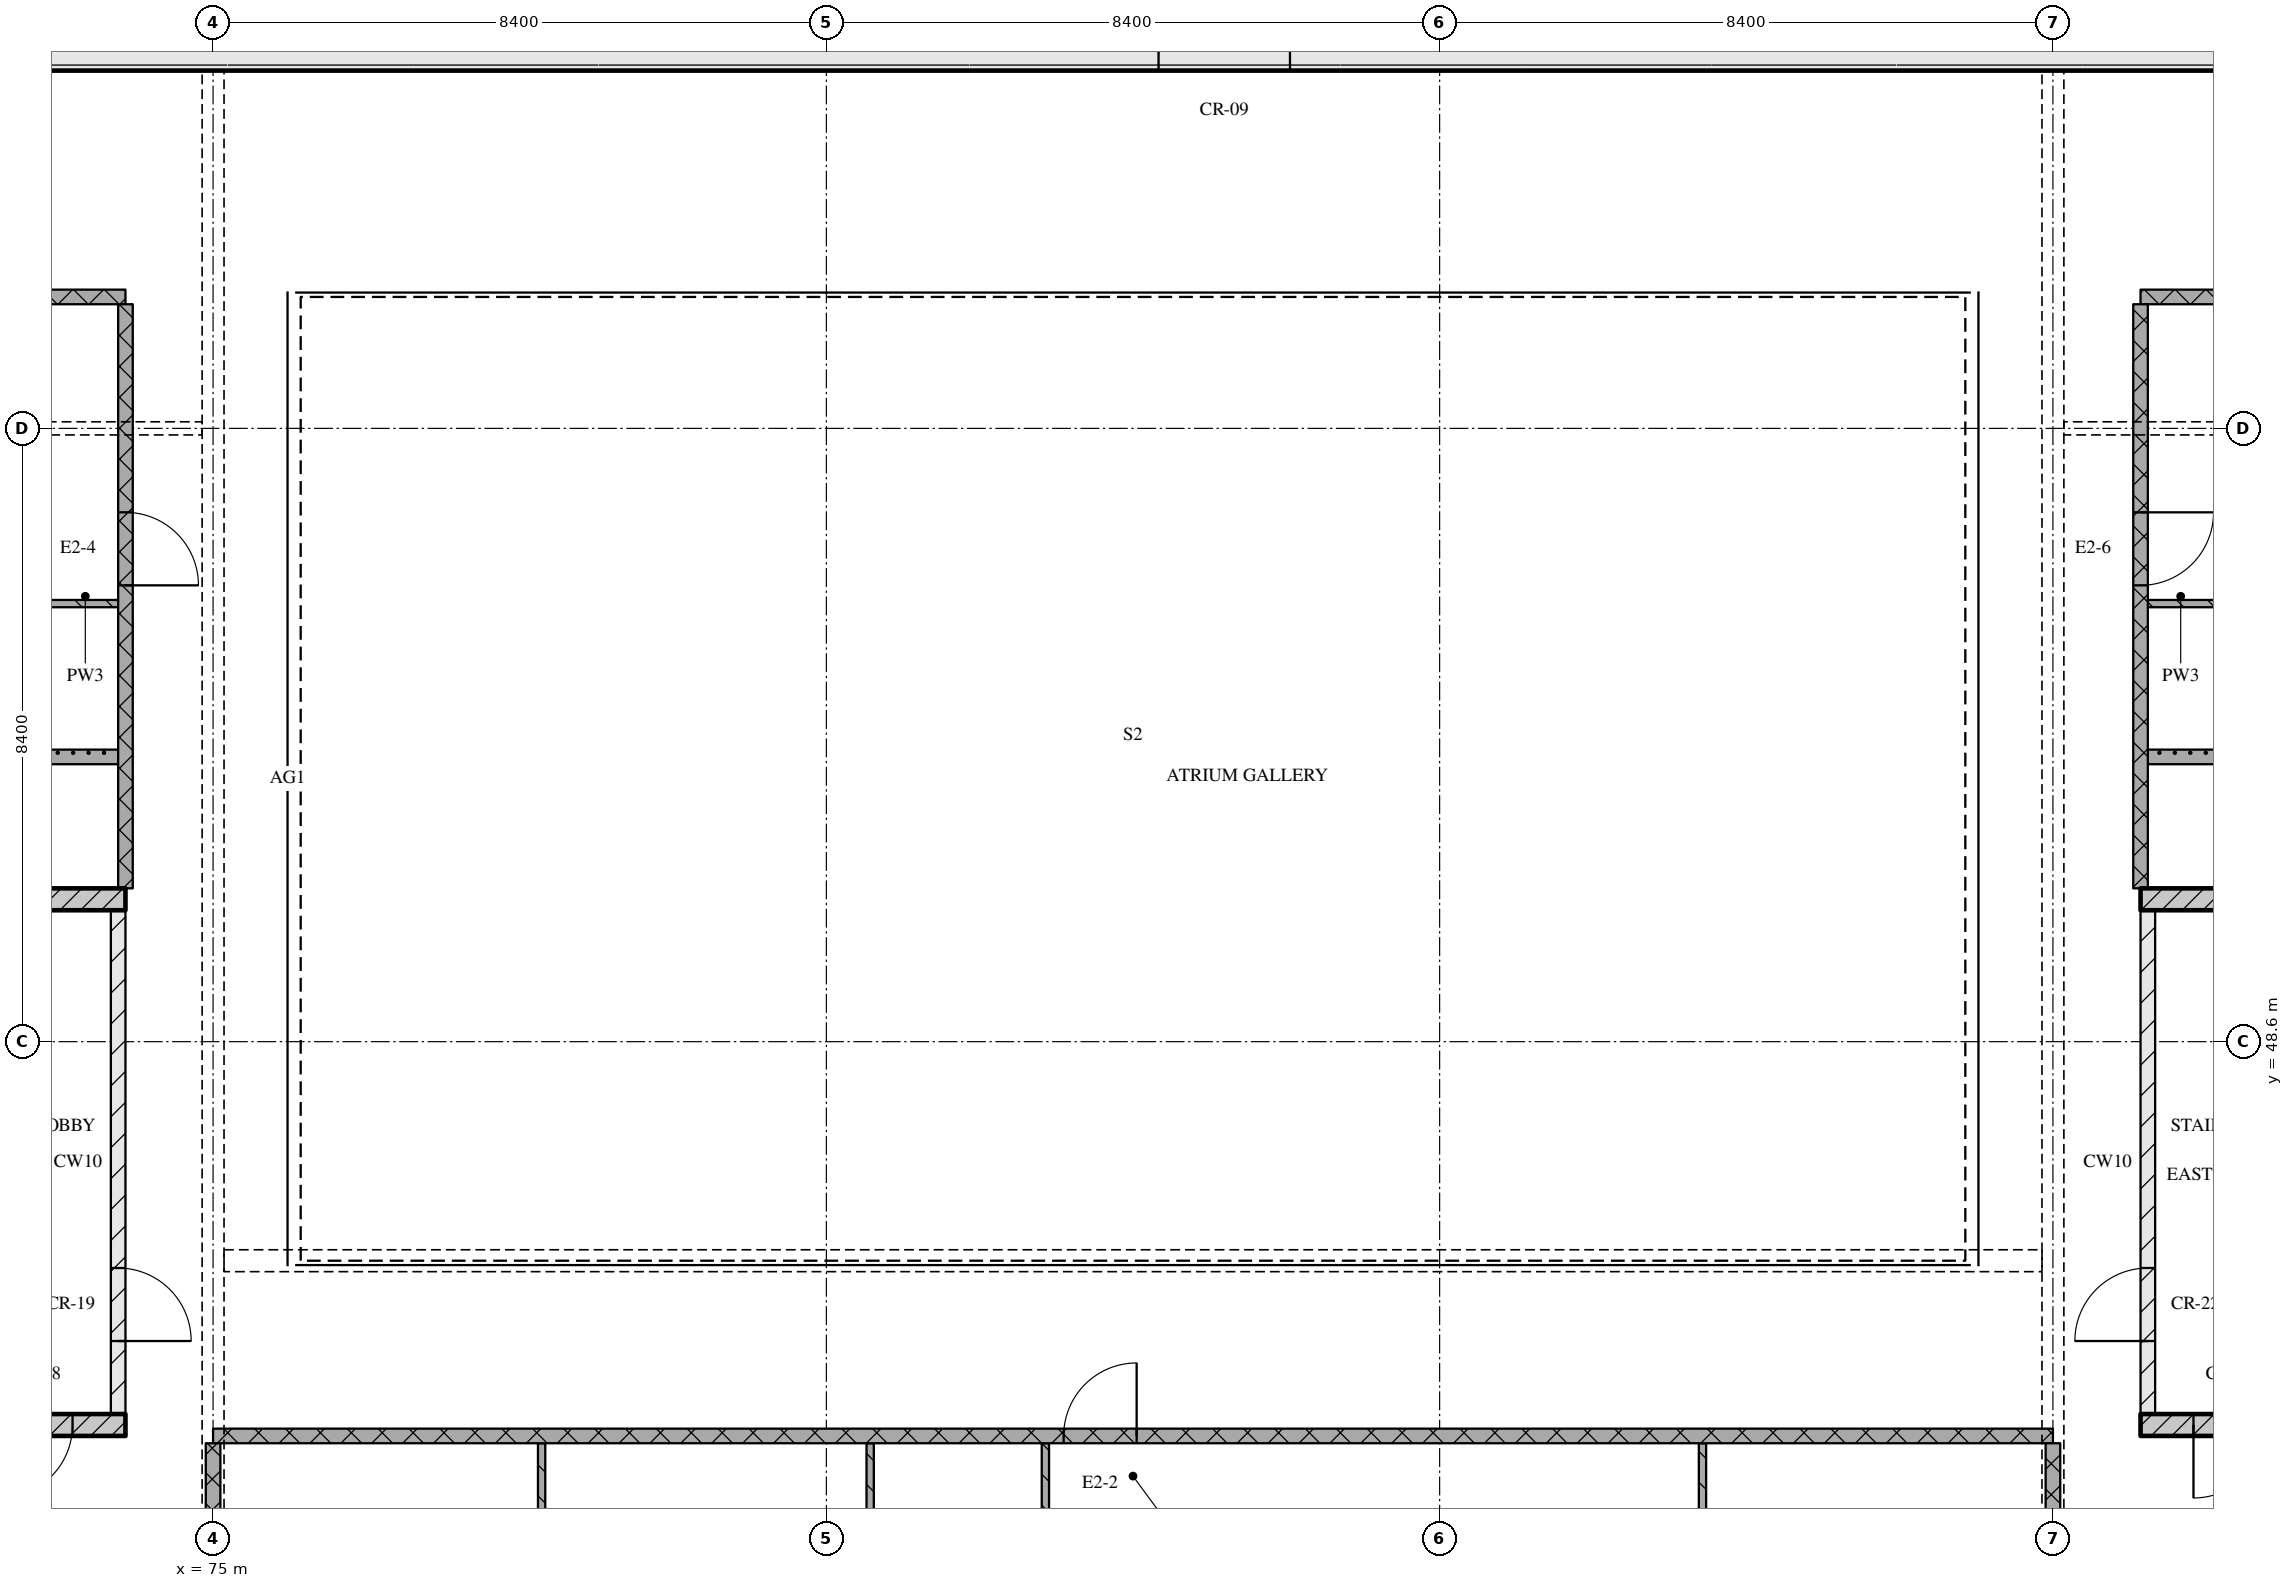
"""IFC4 building model, lengths in metres.
Left out: names, types, materials, properties, quantities, classifications, styles, units other than length and angle.
Written with IfcOpenShell. Run it as: python <this file> out.ifc"""

import sys

from ifc_helpers import new_model, si_unit, direction, frame, frame_2d, origin, place, context, subcontext, project, spatial, rectangle, extrude, element, fill, save


model = new_model("IFC4")
c1 = context("Model", 3, precision=1e-05, world=origin(), true_north=direction((0.0, 1.0)))
c2 = subcontext(c1, "Body", "Model", "MODEL_VIEW")
j1 = project(units=[si_unit("LENGTHUNIT", "METRE"), si_unit("PLANEANGLEUNIT", "RADIAN")], contexts=[c1])
p1 = place(None, origin())
s1 = spatial("IfcSite", under=j1, at=p1, CompositionType="ELEMENT")
p2 = place(p1, origin())
s2 = spatial("IfcBuilding", under=s1, at=p2, CompositionType="ELEMENT")
p3 = place(p2, frame((0.0, 0.0, 270.75)))
s3 = spatial("IfcBuildingStorey", under=s2, at=p3, CompositionType="ELEMENT", Elevation=270.75)
p4 = place(p3, frame((67.3, 62.15, 0.0), z_axis=(0.0, 0.0, 1.0), x_axis=(1.0, 0.0, 0.0)))
e1 = element("IfcWall", 1, at=p4, inside=s3, PredefinedType="SOLIDWALL", context=c2, shape_type="SweptSolid", body=[
    extrude(rectangle(XDim=40.6, YDim=0.5, at=frame_2d((20.3, 0.0))), origin(), (0.0, 0.0, 1.0), 3.32),
])
p5 = place(p4, frame((20.65, 0.0, 0.0)))
e2 = element("IfcOpeningElement", 2, at=p5, cuts=e1, PredefinedType="OPENING", context=c2, shape_type="SweptSolid", body=[
    extrude(rectangle(XDim=1.8, YDim=2.1, at=frame_2d((0.9, 1.05))), frame((0.0, 0.26, 0.0), z_axis=(0.0, -1.0, 0.0), x_axis=(1.0, 0.0, 0.0)), (0.0, 0.0, 1.0), 0.52),
])
p6 = place(p3, frame((68.2, 43.35, 0.0), z_axis=(0.0, 0.0, 1.0), x_axis=(1.0, 0.0, 0.0)))
e3 = element("IfcWall", 3, at=p6, inside=s3, PredefinedType="SOLIDWALL", context=c2, shape_type="SweptSolid", body=[
    extrude(rectangle(XDim=5.6, YDim=0.3, at=frame_2d((2.8, 0.0))), origin(), (0.0, 0.0, 1.0), 3.32),
])
p7 = place(p6, frame((3.875, 0.0, 0.0)))
e4 = element("IfcOpeningElement", 4, at=p7, cuts=e3, PredefinedType="OPENING", context=c2, shape_type="SweptSolid", body=[
    extrude(rectangle(XDim=1.0, YDim=2.1, at=frame_2d((0.5, 1.05))), frame((0.0, 0.16, 0.0), z_axis=(0.0, -1.0, 0.0), x_axis=(1.0, 0.0, 0.0)), (0.0, 0.0, 1.0), 0.32),
])
p8 = place(p3, frame((73.7, 43.5, 0.0), z_axis=(0.0, 0.0, 1.0), x_axis=(0.0, 1.0, 0.0)))
e5 = element("IfcWall", 5, at=p8, inside=s3, PredefinedType="PARTITIONING", context=c2, shape_type="SweptSolid", body=[
    extrude(rectangle(XDim=6.9, YDim=0.2, at=frame_2d((3.45, 0.0))), origin(), (0.0, 0.0, 1.0), 3.32),
])
p9 = place(p8, frame((1.0, 0.0, 0.0)))
e6 = element("IfcOpeningElement", 6, at=p9, cuts=e5, PredefinedType="OPENING", context=c2, shape_type="SweptSolid", body=[
    extrude(rectangle(XDim=1.0, YDim=2.1, at=frame_2d((0.5, 1.05))), frame((0.0, 0.11, 0.0), z_axis=(0.0, -1.0, 0.0), x_axis=(1.0, 0.0, 0.0)), (0.0, 0.0, 1.0), 0.22),
])
p10 = place(p3, frame((68.2, 50.55, 0.0), z_axis=(0.0, 0.0, 1.0), x_axis=(1.0, 0.0, 0.0)))
e7 = element("IfcWall", 7, at=p10, inside=s3, PredefinedType="SOLIDWALL", context=c2, shape_type="SweptSolid", body=[
    extrude(rectangle(XDim=5.6, YDim=0.3, at=frame_2d((2.8, 0.0))), origin(), (0.0, 0.0, 1.0), 3.32),
])
p11 = place(p3, frame((101.4, 43.35, 0.0), z_axis=(0.0, 0.0, 1.0), x_axis=(1.0, 0.0, 0.0)))
e8 = element("IfcWall", 8, at=p11, inside=s3, PredefinedType="SOLIDWALL", context=c2, shape_type="SweptSolid", body=[
    extrude(rectangle(XDim=5.6, YDim=0.3, at=frame_2d((2.8, 0.0))), origin(), (0.0, 0.0, 1.0), 3.32),
])
p12 = place(p11, frame((0.725, 0.0, 0.0)))
e9 = element("IfcOpeningElement", 9, at=p12, cuts=e8, PredefinedType="OPENING", context=c2, shape_type="SweptSolid", body=[
    extrude(rectangle(XDim=1.0, YDim=2.1, at=frame_2d((0.5, 1.05))), frame((0.0, 0.16, 0.0), z_axis=(0.0, -1.0, 0.0), x_axis=(1.0, 0.0, 0.0)), (0.0, 0.0, 1.0), 0.32),
])
p13 = place(p3, frame((101.5, 43.5, 0.0), z_axis=(0.0, 0.0, 1.0), x_axis=(0.0, 1.0, 0.0)))
e10 = element("IfcWall", 10, at=p13, inside=s3, PredefinedType="PARTITIONING", context=c2, shape_type="SweptSolid", body=[
    extrude(rectangle(XDim=6.9, YDim=0.2, at=frame_2d((3.45, 0.0))), origin(), (0.0, 0.0, 1.0), 3.32),
])
p14 = place(p13, frame((1.0, 0.0, 0.0)))
e11 = element("IfcOpeningElement", 11, at=p14, cuts=e10, PredefinedType="OPENING", context=c2, shape_type="SweptSolid", body=[
    extrude(rectangle(XDim=1.0, YDim=2.1, at=frame_2d((0.5, 1.05))), frame((0.0, 0.11, 0.0), z_axis=(0.0, -1.0, 0.0), x_axis=(1.0, 0.0, 0.0)), (0.0, 0.0, 1.0), 0.22),
])
p15 = place(p3, frame((101.4, 50.55, 0.0), z_axis=(0.0, 0.0, 1.0), x_axis=(1.0, 0.0, 0.0)))
e12 = element("IfcWall", 12, at=p15, inside=s3, PredefinedType="SOLIDWALL", context=c2, shape_type="SweptSolid", body=[
    extrude(rectangle(XDim=5.6, YDim=0.3, at=frame_2d((2.8, 0.0))), origin(), (0.0, 0.0, 1.0), 3.32),
])
p16 = place(p3, frame((100.2, 43.2, 0.0), z_axis=(0.0, 0.0, 1.0), x_axis=(-1.0, 0.0, 0.0)))
e13 = element("IfcWall", 13, at=p16, inside=s3, PredefinedType="PARTITIONING", context=c2, shape_type="SweptSolid", body=[
    extrude(rectangle(XDim=25.2, YDim=0.2, at=frame_2d((12.6, 0.0))), origin(), (0.0, 0.0, 1.0), 3.32),
])
p17 = place(p16, frame((12.55, 0.0, 0.0)))
e14 = element("IfcOpeningElement", 14, at=p17, cuts=e13, PredefinedType="OPENING", context=c2, shape_type="SweptSolid", body=[
    extrude(rectangle(XDim=1.0, YDim=2.1, at=frame_2d((0.5, 1.05))), frame((0.0, 0.11, 0.0), z_axis=(0.0, -1.0, 0.0), x_axis=(1.0, 0.0, 0.0)), (0.0, 0.0, 1.0), 0.22),
])
for number, where, z_axis, x_axis in (
    (15, (56.68, 52.5, 0.0), (0.0, 0.0, 1.0), (1.0, 0.0, 0.0)),
    (16, (101.5, 52.5, 0.0), (0.0, 0.0, 1.0), (1.0, 0.0, 0.0)),
):
    element("IfcWall", number, at=place(p3, frame(where, z_axis=z_axis, x_axis=x_axis)), inside=s3, PredefinedType="PARTITIONING", context=c2, shape_type="SweptSolid", body=[
        extrude(rectangle(XDim=17.02, YDim=0.2, at=frame_2d((8.51, 0.0))), origin(), (0.0, 0.0, 1.0), 3.32),
    ])
p18 = place(p3, frame((73.7, 54.6, 0.0), z_axis=(0.0, 0.0, 1.0), x_axis=(-1.0, 0.0, 0.0)))
e17 = element("IfcWall", 17, at=p18, inside=s3, PredefinedType="PARTITIONING", context=c2, shape_type="SweptSolid", body=[
    extrude(rectangle(XDim=8.9, YDim=0.1, at=frame_2d((4.45, 0.0))), origin(), (0.0, 0.0, 1.0), 3.32),
])
p19 = place(p18, frame((4.0, 0.0, 0.0)))
e18 = element("IfcOpeningElement", 18, at=p19, cuts=e17, PredefinedType="OPENING", context=c2, shape_type="SweptSolid", body=[
    extrude(rectangle(XDim=0.8, YDim=2.1, at=frame_2d((0.4, 1.05))), frame((0.0, 0.06, 0.0), z_axis=(0.0, -1.0, 0.0), x_axis=(1.0, 0.0, 0.0)), (0.0, 0.0, 1.0), 0.12),
])
p20 = place(p3, frame((101.5, 54.6, 0.0), z_axis=(0.0, 0.0, 1.0), x_axis=(1.0, 0.0, 0.0)))
e19 = element("IfcWall", 19, at=p20, inside=s3, PredefinedType="PARTITIONING", context=c2, shape_type="SweptSolid", body=[
    extrude(rectangle(XDim=8.9, YDim=0.1, at=frame_2d((4.45, 0.0))), origin(), (0.0, 0.0, 1.0), 3.32),
])
for number, where, z_axis, x_axis in (
    (20, (64.2, 58.8, 0.0), (0.0, 0.0, 1.0), (1.0, 0.0, 0.0)),
    (21, (101.4, 58.8, 0.0), (0.0, 0.0, 1.0), (1.0, 0.0, 0.0)),
):
    element("IfcWall", number, at=place(p3, frame(where, z_axis=z_axis, x_axis=x_axis)), inside=s3, PredefinedType="PARTITIONING", context=c2, shape_type="SweptSolid", body=[
        extrude(rectangle(XDim=9.6, YDim=0.2, at=frame_2d((4.8, 0.0))), origin(), (0.0, 0.0, 1.0), 3.32),
    ])
p21 = place(p3, frame((73.8, 50.7, 0.0), z_axis=(0.0, 0.0, 1.0), x_axis=(0.0, 1.0, 0.0)))
e22 = element("IfcWall", 22, at=p21, inside=s3, PredefinedType="PARTITIONING", context=c2, shape_type="SweptSolid", body=[
    extrude(rectangle(XDim=8.0, YDim=0.2, at=frame_2d((4.0, 0.0))), origin(), (0.0, 0.0, 1.0), 3.32),
])
p22 = place(p21, frame((4.15, 0.0, 0.0)))
e23 = element("IfcOpeningElement", 23, at=p22, cuts=e22, PredefinedType="OPENING", context=c2, shape_type="SweptSolid", body=[
    extrude(rectangle(XDim=1.0, YDim=2.1, at=frame_2d((0.5, 1.05))), frame((0.0, 0.11, 0.0), z_axis=(0.0, -1.0, 0.0), x_axis=(1.0, 0.0, 0.0)), (0.0, 0.0, 1.0), 0.22),
])
p23 = place(p3, frame((75.0, 43.1, 0.0), z_axis=(0.0, 0.0, 1.0), x_axis=(0.0, -1.0, 0.0)))
e24 = element("IfcWall", 24, at=p23, inside=s3, PredefinedType="PARTITIONING", context=c2, shape_type="SweptSolid", body=[
    extrude(rectangle(XDim=2.2, YDim=0.2, at=frame_2d((1.1, 0.0))), origin(), (0.0, 0.0, 1.0), 2.53),
])
for number, where, z_axis, x_axis in (
    (25, (79.5, 43.1, 0.0), (0.0, 0.0, 1.0), (0.0, -1.0, 0.0)),
    (26, (84.0, 43.1, 0.0), (0.0, 0.0, 1.0), (0.0, -1.0, 0.0)),
):
    element("IfcWall", number, at=place(p3, frame(where, z_axis=z_axis, x_axis=x_axis)), inside=s3, PredefinedType="PARTITIONING", context=c2, shape_type="SweptSolid", body=[
        extrude(rectangle(XDim=4.95, YDim=0.1, at=frame_2d((2.475, 0.0))), origin(), (0.0, 0.0, 1.0), 3.32),
    ])
p24 = place(p3, frame((86.4, 38.15, 0.0), z_axis=(0.0, 0.0, 1.0), x_axis=(0.0, 1.0, 0.0)))
e27 = element("IfcWall", 27, at=p24, inside=s3, PredefinedType="PARTITIONING", context=c2, shape_type="SweptSolid", body=[
    extrude(rectangle(XDim=4.95, YDim=0.1, at=frame_2d((2.475, 0.0))), origin(), (0.0, 0.0, 1.0), 3.32),
])
p25 = place(p24, frame((2.05, 0.0, 0.0)))
e28 = element("IfcOpeningElement", 28, at=p25, cuts=e27, PredefinedType="OPENING", context=c2, shape_type="SweptSolid", body=[
    extrude(rectangle(XDim=0.9, YDim=2.1, at=frame_2d((0.45, 1.05))), frame((0.0, 0.06, 0.0), z_axis=(0.0, -1.0, 0.0), x_axis=(1.0, 0.0, 0.0)), (0.0, 0.0, 1.0), 0.12),
])
p26 = place(p3, frame((95.4, 43.1, 0.0), z_axis=(0.0, 0.0, 1.0), x_axis=(0.0, -1.0, 0.0)))
e29 = element("IfcWall", 29, at=p26, inside=s3, PredefinedType="PARTITIONING", context=c2, shape_type="SweptSolid", body=[
    extrude(rectangle(XDim=4.95, YDim=0.1, at=frame_2d((2.475, 0.0))), origin(), (0.0, 0.0, 1.0), 3.32),
])
p27 = place(p3, frame((100.2, 43.1, 0.0), z_axis=(0.0, 0.0, 1.0), x_axis=(0.0, -1.0, 0.0)))
e30 = element("IfcWall", 30, at=p27, inside=s3, PredefinedType="PARTITIONING", context=c2, shape_type="SweptSolid", body=[
    extrude(rectangle(XDim=2.2, YDim=0.2, at=frame_2d((1.1, 0.0))), origin(), (0.0, 0.0, 1.0), 2.53),
])
p28 = place(p3, frame((101.4, 58.7, 0.0), z_axis=(0.0, 0.0, 1.0), x_axis=(0.0, -1.0, 0.0)))
e31 = element("IfcWall", 31, at=p28, inside=s3, PredefinedType="PARTITIONING", context=c2, shape_type="SweptSolid", body=[
    extrude(rectangle(XDim=8.0, YDim=0.2, at=frame_2d((4.0, 0.0))), origin(), (0.0, 0.0, 1.0), 3.32),
])
p29 = place(p28, frame((2.85, 0.0, 0.0)))
e32 = element("IfcOpeningElement", 32, at=p29, cuts=e31, PredefinedType="OPENING", context=c2, shape_type="SweptSolid", body=[
    extrude(rectangle(XDim=1.0, YDim=2.1, at=frame_2d((0.5, 1.05))), frame((0.0, 0.11, 0.0), z_axis=(0.0, -1.0, 0.0), x_axis=(1.0, 0.0, 0.0)), (0.0, 0.0, 1.0), 0.22),
])
p30 = place(p5, origin())
e33 = element("IfcDoor", 33, at=p30, inside=s3, OperationType="DOUBLE_DOOR_SINGLE_SWING", PredefinedType="DOOR", context=c2, shape_type="SweptSolid", body=[
    extrude(rectangle(XDim=1.8, YDim=2.1, at=frame_2d((0.9, 1.05))), frame((0.0, 0.025, 0.0), z_axis=(0.0, -1.0, 0.0), x_axis=(1.0, 0.0, 0.0)), (0.0, 0.0, 1.0), 0.05),
])
fill(e2, e33)
p31 = place(p7, origin())
e34 = element("IfcDoor", 34, at=p31, inside=s3, OperationType="SINGLE_SWING_RIGHT", PredefinedType="DOOR", context=c2, shape_type="SweptSolid", body=[
    extrude(rectangle(XDim=1.0, YDim=2.1, at=frame_2d((0.5, 1.05))), frame((0.0, 0.025, 0.0), z_axis=(0.0, -1.0, 0.0), x_axis=(1.0, 0.0, 0.0)), (0.0, 0.0, 1.0), 0.05),
])
fill(e4, e34)
p32 = place(p9, origin())
e35 = element("IfcDoor", 35, at=p32, inside=s3, OperationType="SINGLE_SWING_RIGHT", PredefinedType="DOOR", context=c2, shape_type="SweptSolid", body=[
    extrude(rectangle(XDim=1.0, YDim=2.1, at=frame_2d((0.5, 1.05))), frame((0.0, 0.025, 0.0), z_axis=(0.0, -1.0, 0.0), x_axis=(1.0, 0.0, 0.0)), (0.0, 0.0, 1.0), 0.05),
])
fill(e6, e35)
p33 = place(p12, origin())
e36 = element("IfcDoor", 36, at=p33, inside=s3, OperationType="SINGLE_SWING_RIGHT", PredefinedType="DOOR", context=c2, shape_type="SweptSolid", body=[
    extrude(rectangle(XDim=1.0, YDim=2.1, at=frame_2d((0.5, 1.05))), frame((0.0, 0.025, 0.0), z_axis=(0.0, -1.0, 0.0), x_axis=(1.0, 0.0, 0.0)), (0.0, 0.0, 1.0), 0.05),
])
fill(e9, e36)
p34 = place(p14, origin())
e37 = element("IfcDoor", 37, at=p34, inside=s3, OperationType="SINGLE_SWING_LEFT", PredefinedType="DOOR", context=c2, shape_type="SweptSolid", body=[
    extrude(rectangle(XDim=1.0, YDim=2.1, at=frame_2d((0.5, 1.05))), frame((0.0, 0.025, 0.0), z_axis=(0.0, -1.0, 0.0), x_axis=(1.0, 0.0, 0.0)), (0.0, 0.0, 1.0), 0.05),
])
fill(e11, e37)
p35 = place(p17, origin())
e38 = element("IfcDoor", 38, at=p35, inside=s3, OperationType="SINGLE_SWING_RIGHT", PredefinedType="DOOR", context=c2, shape_type="SweptSolid", body=[
    extrude(rectangle(XDim=1.0, YDim=2.1, at=frame_2d((0.5, 1.05))), frame((0.0, 0.025, 0.0), z_axis=(0.0, -1.0, 0.0), x_axis=(1.0, 0.0, 0.0)), (0.0, 0.0, 1.0), 0.05),
])
fill(e14, e38)
p36 = place(p22, origin())
e39 = element("IfcDoor", 39, at=p36, inside=s3, OperationType="SINGLE_SWING_RIGHT", PredefinedType="DOOR", context=c2, shape_type="SweptSolid", body=[
    extrude(rectangle(XDim=1.0, YDim=2.1, at=frame_2d((0.5, 1.05))), frame((0.0, 0.025, 0.0), z_axis=(0.0, -1.0, 0.0), x_axis=(1.0, 0.0, 0.0)), (0.0, 0.0, 1.0), 0.05),
])
fill(e23, e39)
p37 = place(p29, origin())
e40 = element("IfcDoor", 40, at=p37, inside=s3, OperationType="SINGLE_SWING_LEFT", PredefinedType="DOOR", context=c2, shape_type="SweptSolid", body=[
    extrude(rectangle(XDim=1.0, YDim=2.1, at=frame_2d((0.5, 1.05))), frame((0.0, 0.025, 0.0), z_axis=(0.0, -1.0, 0.0), x_axis=(1.0, 0.0, 0.0)), (0.0, 0.0, 1.0), 0.05),
])
fill(e32, e40)
save(model, sys.argv[1])
